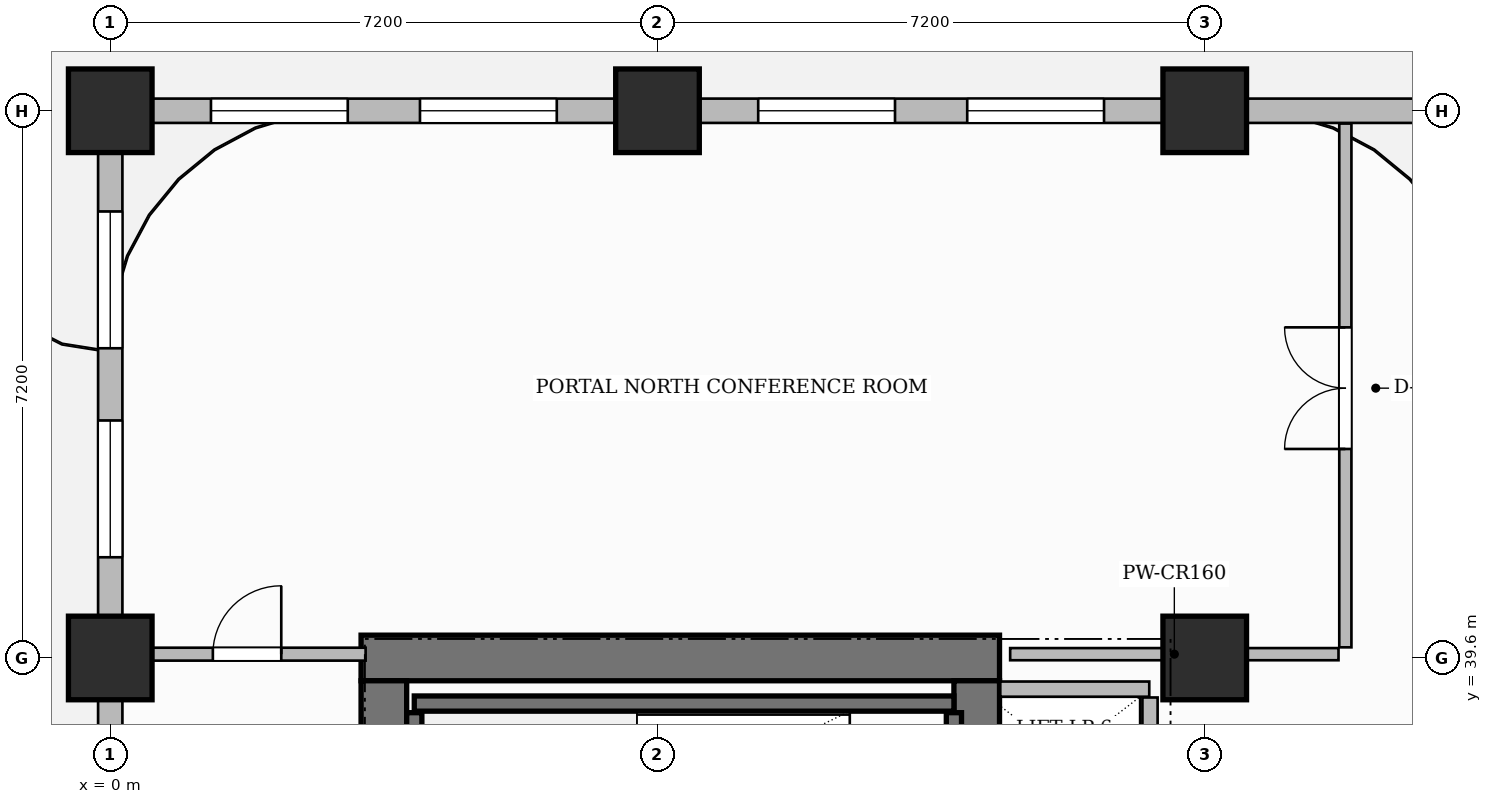
"""IFC4 building model, lengths in metres.
Left out: names, types, materials, properties, quantities, classifications, styles, units other than length and angle.
Written with IfcOpenShell. Run it as: python <this file> out.ifc"""

import sys

from ifc_helpers import new_model, si_unit, direction, frame, frame_2d, origin, origin_2d, place, context, subcontext, project, spatial, rectangle, extrude, source, transform, mapped, element, fill, save


model = new_model("IFC4")
c1 = context("Model", 3, precision=1e-05, world=origin(), true_north=direction((0.0, 1.0)))
c2 = subcontext(c1, "Body", "Model", "MODEL_VIEW")
j1 = project(units=[si_unit("LENGTHUNIT", "METRE"), si_unit("PLANEANGLEUNIT", "RADIAN")], contexts=[c1])
p1 = place(None, origin())
s1 = spatial("IfcSite", under=j1, at=p1, CompositionType="ELEMENT")
p2 = place(p1, origin())
s2 = spatial("IfcBuilding", under=s1, at=p2, CompositionType="ELEMENT")
p3 = place(p2, frame((0.0, 0.0, 62.0)))
s3 = spatial("IfcBuildingStorey", under=s2, at=p3, CompositionType="ELEMENT", Elevation=62.0)
p4 = place(p3, frame((3.3, 39.6, 0.0), z_axis=(0.0, 0.0, 1.0), x_axis=(1.0, 0.0, 0.0)))
e1 = element("IfcWall", 1, at=p4, inside=s3, PredefinedType="SHEAR", context=c2, shape_type="SweptSolid", body=[
    extrude(rectangle(XDim=8.4, YDim=0.6, at=frame_2d((4.2, 0.0))), origin(), (0.0, 0.0, 1.0), 3.7),
])
p5 = place(p3, frame((3.6, 25.5, 0.0), z_axis=(0.0, 0.0, 1.0), x_axis=(0.0, 1.0, 0.0)))
e2 = element("IfcWall", 2, at=p5, inside=s3, PredefinedType="SHEAR", context=c2, shape_type="SweptSolid", body=[
    extrude(rectangle(XDim=13.8, YDim=0.6, at=frame_2d((6.9, 0.0))), origin(), (0.0, 0.0, 1.0), 3.7),
])
p6 = place(p3, frame((11.4, 25.5, 0.0), z_axis=(0.0, 0.0, 1.0), x_axis=(0.0, 1.0, 0.0)))
e3 = element("IfcWall", 3, at=p6, inside=s3, PredefinedType="SHEAR", context=c2, shape_type="SweptSolid", body=[
    extrude(rectangle(XDim=13.8, YDim=0.6, at=frame_2d((6.9, 0.0))), origin(), (0.0, 0.0, 1.0), 3.7),
])
p7 = place(p6, frame((6.47, 0.0, 0.0)))
e4 = element("IfcOpeningElement", 4, at=p7, cuts=e3, PredefinedType="OPENING", context=c2, shape_type="SweptSolid", body=[
    extrude(rectangle(XDim=1.5, YDim=2.2, at=frame_2d((0.75, 1.1))), frame((0.0, 0.31, 0.0), z_axis=(0.0, -1.0, 0.0), x_axis=(1.0, 0.0, 0.0)), (0.0, 0.0, 1.0), 0.62),
])
m1 = source(origin(), c2, "Body", "SweptSolid", [
    extrude(rectangle(XDim=1.1, YDim=1.1, at=origin_2d()), origin(), (0.0, 0.0, 1.0), 3.7),
])
for number, where, z_axis, x_axis in (
    (5, (0.0, 39.6, 0.0), (0.0, 0.0, 1.0), (1.0, 0.0, 0.0)),
    (6, (0.0, 46.8, 0.0), (0.0, 0.0, 1.0), (1.0, 0.0, 0.0)),
    (7, (7.2, 46.8, 0.0), (0.0, 0.0, 1.0), (1.0, 0.0, 0.0)),
    (8, (14.4, 39.6, 0.0), (0.0, 0.0, 1.0), (1.0, 0.0, 0.0)),
    (9, (14.4, 46.8, 0.0), (0.0, 0.0, 1.0), (1.0, 0.0, 0.0)),
):
    element("IfcColumn", number, at=place(p3, frame(where, z_axis=z_axis, x_axis=x_axis)), inside=s3, PredefinedType="COLUMN", context=c2, shape_type="MappedRepresentation", body=[
        mapped(m1, transform((0.0, 0.0, 0.0), scale=1.0)),
    ])
p8 = place(p3, frame((4.0, 39.0, 0.0), z_axis=(0.0, 0.0, 1.0), x_axis=(1.0, 0.0, 0.0)))
e10 = element("IfcWall", 10, at=p8, inside=s3, PredefinedType="SHEAR", context=c2, shape_type="SweptSolid", body=[
    extrude(rectangle(XDim=7.1, YDim=0.2, at=frame_2d((3.55, 0.0))), origin(), (0.0, 0.0, 1.0), 3.7),
])
for number, where, z_axis, x_axis in (
    (11, (4.0, 36.18, 0.0), (0.0, 0.0, 1.0), (0.0, 1.0, 0.0)),
    (12, (11.1, 36.18, 0.0), (0.0, 0.0, 1.0), (0.0, 1.0, 0.0)),
):
    element("IfcWall", number, at=place(p3, frame(where, z_axis=z_axis, x_axis=x_axis)), inside=s3, PredefinedType="SHEAR", context=c2, shape_type="SweptSolid", body=[
        extrude(rectangle(XDim=2.7, YDim=0.2, at=frame_2d((1.35, 0.0))), origin(), (0.0, 0.0, 1.0), 3.7),
    ])
p9 = place(p3, frame((11.71, 39.19, 0.0), z_axis=(0.0, 0.0, 1.0), x_axis=(1.0, 0.0, 0.0)))
e13 = element("IfcWall", 13, at=p9, inside=s3, PredefinedType="PARTITIONING", context=c2, shape_type="SweptSolid", body=[
    extrude(rectangle(XDim=1.96, YDim=0.2, at=frame_2d((0.98, 0.0))), origin(), (0.0, 0.0, 1.0), 3.45),
])
p10 = place(p3, frame((13.68, 34.36, 0.0), z_axis=(0.0, 0.0, 1.0), x_axis=(0.0, 1.0, 0.0)))
e14 = element("IfcWall", 14, at=p10, inside=s3, PredefinedType="PARTITIONING", context=c2, shape_type="SweptSolid", body=[
    extrude(rectangle(XDim=4.72, YDim=0.2, at=frame_2d((2.36, 0.0))), origin(), (0.0, 0.0, 1.0), 3.45),
])
p11 = place(p3, frame((16.25, 39.74, 0.0), z_axis=(0.0, 0.0, 1.0), x_axis=(0.0, 1.0, 0.0)))
e15 = element("IfcWall", 15, at=p11, inside=s3, PredefinedType="PARTITIONING", context=c2, shape_type="SweptSolid", body=[
    extrude(rectangle(XDim=6.892, YDim=0.16, at=frame_2d((3.446, 0.0))), origin(), (0.0, 0.0, 1.0), 3.45),
])
p12 = place(p11, frame((2.61, 0.0, 0.0)))
e16 = element("IfcOpeningElement", 16, at=p12, cuts=e15, PredefinedType="OPENING", context=c2, shape_type="SweptSolid", body=[
    extrude(rectangle(XDim=1.6, YDim=2.4, at=frame_2d((0.8, 1.2))), frame((0.0, 0.09, 0.0), z_axis=(0.0, -1.0, 0.0), x_axis=(1.0, 0.0, 0.0)), (0.0, 0.0, 1.0), 0.18),
])
p13 = place(p3, frame((11.84, 39.65, 0.0), z_axis=(0.0, 0.0, 1.0), x_axis=(1.0, 0.0, 0.0)))
e17 = element("IfcWall", 17, at=p13, inside=s3, PredefinedType="PARTITIONING", context=c2, shape_type="SweptSolid", body=[
    extrude(rectangle(XDim=4.32, YDim=0.16, at=frame_2d((2.16, 0.0))), origin(), (0.0, 0.0, 1.0), 2.885),
])
p14 = place(p3, frame((0.24, 39.65, 0.0), z_axis=(0.0, 0.0, 1.0), x_axis=(1.0, 0.0, 0.0)))
e18 = element("IfcWall", 18, at=p14, inside=s3, PredefinedType="PARTITIONING", context=c2, shape_type="SweptSolid", body=[
    extrude(rectangle(XDim=3.12, YDim=0.17, at=frame_2d((1.56, 0.0))), origin(), (0.0, 0.0, 1.0), 3.45),
])
p15 = place(p14, frame((1.11, 0.0, 0.0)))
e19 = element("IfcOpeningElement", 19, at=p15, cuts=e18, PredefinedType="OPENING", context=c2, shape_type="SweptSolid", body=[
    extrude(rectangle(XDim=0.9, YDim=2.15, at=frame_2d((0.45, 1.075))), frame((0.0, 0.095, 0.0), z_axis=(0.0, -1.0, 0.0), x_axis=(1.0, 0.0, 0.0)), (0.0, 0.0, 1.0), 0.19),
])
p16 = place(p3, frame((0.0, 46.8, 0.0), z_axis=(0.0, 0.0, 1.0), x_axis=(1.0, 0.0, 0.0)))
e20 = element("IfcWall", 20, at=p16, inside=s3, PredefinedType="SOLIDWALL", context=c2, shape_type="SweptSolid", body=[
    extrude(rectangle(XDim=18.0, YDim=0.32, at=frame_2d((9.0, 0.0))), origin(), (0.0, 0.0, 1.0), 2.885),
])
p17 = place(p16, frame((1.325, 0.0, 0.8)))
e21 = element("IfcOpeningElement", 21, at=p17, cuts=e20, PredefinedType="OPENING", context=c2, shape_type="SweptSolid", body=[
    extrude(rectangle(XDim=1.8, YDim=1.85, at=frame_2d((0.9, 0.925))), frame((0.0, 0.17, 0.0), z_axis=(0.0, -1.0, 0.0), x_axis=(1.0, 0.0, 0.0)), (0.0, 0.0, 1.0), 0.34),
])
p18 = place(p16, frame((4.075, 0.0, 0.8)))
e22 = element("IfcOpeningElement", 22, at=p18, cuts=e20, PredefinedType="OPENING", context=c2, shape_type="SweptSolid", body=[
    extrude(rectangle(XDim=1.8, YDim=1.85, at=frame_2d((0.9, 0.925))), frame((0.0, 0.17, 0.0), z_axis=(0.0, -1.0, 0.0), x_axis=(1.0, 0.0, 0.0)), (0.0, 0.0, 1.0), 0.34),
])
p19 = place(p16, frame((8.525, 0.0, 0.8)))
e23 = element("IfcOpeningElement", 23, at=p19, cuts=e20, PredefinedType="OPENING", context=c2, shape_type="SweptSolid", body=[
    extrude(rectangle(XDim=1.8, YDim=1.85, at=frame_2d((0.9, 0.925))), frame((0.0, 0.17, 0.0), z_axis=(0.0, -1.0, 0.0), x_axis=(1.0, 0.0, 0.0)), (0.0, 0.0, 1.0), 0.34),
])
p20 = place(p16, frame((11.275, 0.0, 0.8)))
e24 = element("IfcOpeningElement", 24, at=p20, cuts=e20, PredefinedType="OPENING", context=c2, shape_type="SweptSolid", body=[
    extrude(rectangle(XDim=1.8, YDim=1.85, at=frame_2d((0.9, 0.925))), frame((0.0, 0.17, 0.0), z_axis=(0.0, -1.0, 0.0), x_axis=(1.0, 0.0, 0.0)), (0.0, 0.0, 1.0), 0.34),
])
p21 = place(p3, frame((0.0, 25.25, 0.0), z_axis=(0.0, 0.0, 1.0), x_axis=(0.0, 1.0, 0.0)))
e25 = element("IfcWall", 25, at=p21, inside=s3, PredefinedType="SOLIDWALL", context=c2, shape_type="SweptSolid", body=[
    extrude(rectangle(XDim=21.5, YDim=0.32, at=frame_2d((10.75, 0.0))), origin(), (0.0, 0.0, 1.0), 2.885),
])
p22 = place(p21, frame((1.275, 0.0, 0.8)))
e26 = element("IfcOpeningElement", 26, at=p22, cuts=e25, PredefinedType="OPENING", context=c2, shape_type="SweptSolid", body=[
    extrude(rectangle(XDim=1.8, YDim=1.85, at=frame_2d((0.9, 0.925))), frame((0.0, 0.17, 0.0), z_axis=(0.0, -1.0, 0.0), x_axis=(1.0, 0.0, 0.0)), (0.0, 0.0, 1.0), 0.34),
])
p23 = place(p21, frame((4.025, 0.0, 0.8)))
e27 = element("IfcOpeningElement", 27, at=p23, cuts=e25, PredefinedType="OPENING", context=c2, shape_type="SweptSolid", body=[
    extrude(rectangle(XDim=1.8, YDim=1.85, at=frame_2d((0.9, 0.925))), frame((0.0, 0.17, 0.0), z_axis=(0.0, -1.0, 0.0), x_axis=(1.0, 0.0, 0.0)), (0.0, 0.0, 1.0), 0.34),
])
p24 = place(p21, frame((8.475, 0.0, 0.8)))
e28 = element("IfcOpeningElement", 28, at=p24, cuts=e25, PredefinedType="OPENING", context=c2, shape_type="SweptSolid", body=[
    extrude(rectangle(XDim=1.8, YDim=1.85, at=frame_2d((0.9, 0.925))), frame((0.0, 0.17, 0.0), z_axis=(0.0, -1.0, 0.0), x_axis=(1.0, 0.0, 0.0)), (0.0, 0.0, 1.0), 0.34),
])
p25 = place(p21, frame((11.225, 0.0, 0.8)))
e29 = element("IfcOpeningElement", 29, at=p25, cuts=e25, PredefinedType="OPENING", context=c2, shape_type="SweptSolid", body=[
    extrude(rectangle(XDim=1.8, YDim=1.85, at=frame_2d((0.9, 0.925))), frame((0.0, 0.17, 0.0), z_axis=(0.0, -1.0, 0.0), x_axis=(1.0, 0.0, 0.0)), (0.0, 0.0, 1.0), 0.34),
])
p26 = place(p21, frame((15.675, 0.0, 0.8)))
e30 = element("IfcOpeningElement", 30, at=p26, cuts=e25, PredefinedType="OPENING", context=c2, shape_type="SweptSolid", body=[
    extrude(rectangle(XDim=1.8, YDim=1.85, at=frame_2d((0.9, 0.925))), frame((0.0, 0.17, 0.0), z_axis=(0.0, -1.0, 0.0), x_axis=(1.0, 0.0, 0.0)), (0.0, 0.0, 1.0), 0.34),
])
p27 = place(p21, frame((18.425, 0.0, 0.8)))
e31 = element("IfcOpeningElement", 31, at=p27, cuts=e25, PredefinedType="OPENING", context=c2, shape_type="SweptSolid", body=[
    extrude(rectangle(XDim=1.8, YDim=1.85, at=frame_2d((0.9, 0.925))), frame((0.0, 0.17, 0.0), z_axis=(0.0, -1.0, 0.0), x_axis=(1.0, 0.0, 0.0)), (0.0, 0.0, 1.0), 0.34),
])
m2 = source(origin(), c2, "Body", "SweptSolid", [
    extrude(rectangle(XDim=0.9, YDim=2.15, at=frame_2d((0.45, 1.075))), frame((0.0, 0.025, 0.0), z_axis=(0.0, -1.0, 0.0), x_axis=(1.0, 0.0, 0.0)), (0.0, 0.0, 1.0), 0.05),
])
p28 = place(p15, origin())
e32 = element("IfcDoor", 32, at=p28, inside=s3, OperationType="SINGLE_SWING_RIGHT", PredefinedType="DOOR", context=c2, shape_type="MappedRepresentation", body=[
    mapped(m2, transform((0.0, 0.0, 0.0), scale=1.0)),
])
fill(e19, e32)
m3 = source(origin(), c2, "Body", "SweptSolid", [
    extrude(rectangle(XDim=1.6, YDim=2.4, at=frame_2d((0.8, 1.2))), frame((0.0, 0.025, 0.0), z_axis=(0.0, -1.0, 0.0), x_axis=(1.0, 0.0, 0.0)), (0.0, 0.0, 1.0), 0.05),
])
p29 = place(p12, origin())
e33 = element("IfcDoor", 33, at=p29, inside=s3, OperationType="DOUBLE_DOOR_SINGLE_SWING", PredefinedType="DOOR", context=c2, shape_type="MappedRepresentation", body=[
    mapped(m3, transform((0.0, 0.0, 0.0), scale=1.0)),
])
fill(e16, e33)
m4 = source(origin(), c2, "Body", "SweptSolid", [
    extrude(rectangle(XDim=1.8, YDim=1.85, at=frame_2d((0.9, 0.925))), frame((0.0, 0.03, 0.0), z_axis=(0.0, -1.0, 0.0), x_axis=(1.0, 0.0, 0.0)), (0.0, 0.0, 1.0), 0.06),
])
p30 = place(p17, origin())
e34 = element("IfcWindow", 34, at=p30, inside=s3, PartitioningType="DOUBLE_PANEL_VERTICAL", PredefinedType="WINDOW", context=c2, shape_type="MappedRepresentation", body=[
    mapped(m4, transform((0.0, 0.0, 0.0), scale=1.0)),
])
fill(e21, e34)
p31 = place(p18, origin())
e35 = element("IfcWindow", 35, at=p31, inside=s3, PartitioningType="DOUBLE_PANEL_VERTICAL", PredefinedType="WINDOW", context=c2, shape_type="MappedRepresentation", body=[
    mapped(m4, transform((0.0, 0.0, 0.0), scale=1.0)),
])
fill(e22, e35)
p32 = place(p19, origin())
e36 = element("IfcWindow", 36, at=p32, inside=s3, PartitioningType="DOUBLE_PANEL_VERTICAL", PredefinedType="WINDOW", context=c2, shape_type="MappedRepresentation", body=[
    mapped(m4, transform((0.0, 0.0, 0.0), scale=1.0)),
])
fill(e23, e36)
p33 = place(p20, origin())
e37 = element("IfcWindow", 37, at=p33, inside=s3, PartitioningType="DOUBLE_PANEL_VERTICAL", PredefinedType="WINDOW", context=c2, shape_type="MappedRepresentation", body=[
    mapped(m4, transform((0.0, 0.0, 0.0), scale=1.0)),
])
fill(e24, e37)
p34 = place(p26, origin())
e38 = element("IfcWindow", 38, at=p34, inside=s3, PartitioningType="DOUBLE_PANEL_VERTICAL", PredefinedType="WINDOW", context=c2, shape_type="MappedRepresentation", body=[
    mapped(m4, transform((0.0, 0.0, 0.0), scale=1.0)),
])
fill(e30, e38)
p35 = place(p27, origin())
e39 = element("IfcWindow", 39, at=p35, inside=s3, PartitioningType="DOUBLE_PANEL_VERTICAL", PredefinedType="WINDOW", context=c2, shape_type="MappedRepresentation", body=[
    mapped(m4, transform((0.0, 0.0, 0.0), scale=1.0)),
])
fill(e31, e39)
save(model, sys.argv[1])
